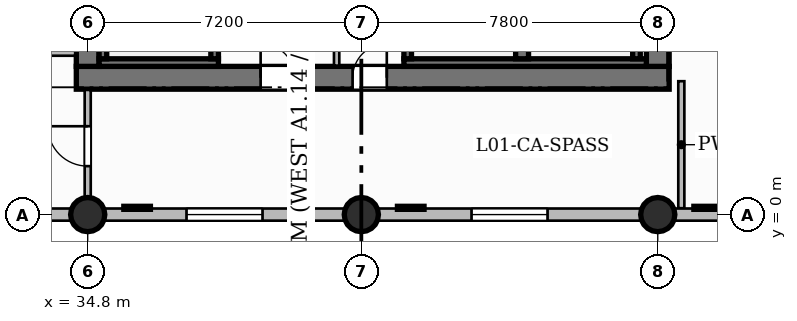
"""IFC4 building model, lengths in metres.
Left out: names, types, materials, properties, quantities, classifications, styles, units other than length and angle.
Written with IfcOpenShell. Run it as: python <this file> out.ifc"""

import sys

from ifc_helpers import new_model, si_unit, direction, frame, frame_2d, origin, origin_2d, place, context, subcontext, project, spatial, rectangle, circle, extrude, source, transform, mapped, element, fill, save


model = new_model("IFC4")
c1 = context("Model", 3, precision=1e-05, world=origin(), true_north=direction((0.0, 1.0)))
c2 = subcontext(c1, "Body", "Model", "MODEL_VIEW")
j1 = project(units=[si_unit("LENGTHUNIT", "METRE"), si_unit("PLANEANGLEUNIT", "RADIAN")], contexts=[c1])
p1 = place(None, origin())
s1 = spatial("IfcSite", under=j1, at=p1, CompositionType="ELEMENT")
p2 = place(p1, origin())
s2 = spatial("IfcBuilding", under=s1, at=p2, CompositionType="ELEMENT")
p3 = place(p2, frame((0.0, 0.0, 5.4)))
s3 = spatial("IfcBuildingStorey", under=s2, at=p3, CompositionType="ELEMENT", Elevation=5.4)
p4 = place(p3, frame((34.5, 3.6, 0.0), z_axis=(0.0, 0.0, 1.0), x_axis=(1.0, 0.0, 0.0)))
e1 = element("IfcWall", 1, at=p4, inside=s3, PredefinedType="SHEAR", context=c2, shape_type="SweptSolid", body=[
    extrude(rectangle(XDim=15.6, YDim=0.6, at=frame_2d((7.8, 0.0))), origin(), (0.0, 0.0, 1.0), 5.4),
])
p5 = place(p4, frame((4.85, 0.0, 0.0)))
e2 = element("IfcOpeningElement", 2, at=p5, cuts=e1, PredefinedType="OPENING", context=c2, shape_type="SweptSolid", body=[
    extrude(rectangle(XDim=0.9, YDim=2.1, at=frame_2d((0.45, 1.05))), frame((0.0, 0.31, 0.0), z_axis=(0.0, -1.0, 0.0), x_axis=(1.0, 0.0, 0.0)), (0.0, 0.0, 1.0), 0.62),
])
p6 = place(p4, frame((7.27, 0.0, 0.0)))
e3 = element("IfcOpeningElement", 3, at=p6, cuts=e1, PredefinedType="OPENING", context=c2, shape_type="SweptSolid", body=[
    extrude(rectangle(XDim=0.9, YDim=2.1, at=frame_2d((0.45, 1.05))), frame((0.0, 0.31, 0.0), z_axis=(0.0, -1.0, 0.0), x_axis=(1.0, 0.0, 0.0)), (0.0, 0.0, 1.0), 0.62),
])
for number, where, z_axis, x_axis in (
    (4, (34.8, 3.9, 0.0), (0.0, 0.0, 1.0), (0.0, 1.0, 0.0)),
    (5, (49.8, 3.9, 0.0), (0.0, 0.0, 1.0), (0.0, 1.0, 0.0)),
):
    element("IfcWall", number, at=place(p3, frame(where, z_axis=z_axis, x_axis=x_axis)), inside=s3, PredefinedType="SHEAR", context=c2, shape_type="SweptSolid", body=[
        extrude(rectangle(XDim=10.2, YDim=0.6, at=frame_2d((5.1, 0.0))), origin(), (0.0, 0.0, 1.0), 5.4),
    ])
m1 = source(origin(), c2, "Body", "SweptSolid", [
    extrude(circle(Radius=0.45, at=origin_2d()), origin(), (0.0, 0.0, 1.0), 5.4),
])
for number, where, z_axis, x_axis in (
    (6, (34.8, 0.0, 0.0), (0.0, 0.0, 1.0), (1.0, 0.0, 0.0)),
    (7, (42.0, 0.0, 0.0), (0.0, 0.0, 1.0), (1.0, 0.0, 0.0)),
    (8, (49.8, 0.0, 0.0), (0.0, 0.0, 1.0), (1.0, 0.0, 0.0)),
):
    element("IfcColumn", number, at=place(p3, frame(where, z_axis=z_axis, x_axis=x_axis)), inside=s3, PredefinedType="COLUMN", context=c2, shape_type="MappedRepresentation", body=[
        mapped(m1, transform((0.0, 0.0, 0.0), scale=1.0)),
    ])
p7 = place(p3, frame((35.1, 4.0, 0.0), z_axis=(0.0, 0.0, 1.0), x_axis=(1.0, 0.0, 0.0)))
e9 = element("IfcWall", 9, at=p7, inside=s3, PredefinedType="SHEAR", context=c2, shape_type="SweptSolid", body=[
    extrude(rectangle(XDim=3.14, YDim=0.2, at=frame_2d((1.57, 0.0))), origin(), (0.0, 0.0, 1.0), 5.4),
])
for number, where, z_axis, x_axis in (
    (10, (35.2, 4.1, 0.0), (0.0, 0.0, 1.0), (0.0, 1.0, 0.0)),
    (11, (38.14, 4.1, 0.0), (0.0, 0.0, 1.0), (0.0, 1.0, 0.0)),
):
    element("IfcWall", number, at=place(p3, frame(where, z_axis=z_axis, x_axis=x_axis)), inside=s3, PredefinedType="SHEAR", context=c2, shape_type="SweptSolid", body=[
        extrude(rectangle(XDim=6.95, YDim=0.2, at=frame_2d((3.475, 0.0))), origin(), (0.0, 0.0, 1.0), 5.4),
    ])
p8 = place(p3, frame((43.12, 4.0, 0.0), z_axis=(0.0, 0.0, 1.0), x_axis=(1.0, 0.0, 0.0)))
e12 = element("IfcWall", 12, at=p8, inside=s3, PredefinedType="SHEAR", context=c2, shape_type="SweptSolid", body=[
    extrude(rectangle(XDim=6.38, YDim=0.2, at=frame_2d((3.19, 0.0))), origin(), (0.0, 0.0, 1.0), 5.4),
])
p9 = place(p3, frame((43.22, 4.1, 0.0), z_axis=(0.0, 0.0, 1.0), x_axis=(0.0, 1.0, 0.0)))
e13 = element("IfcWall", 13, at=p9, inside=s3, PredefinedType="SHEAR", context=c2, shape_type="SweptSolid", body=[
    extrude(rectangle(XDim=6.95, YDim=0.2, at=frame_2d((3.475, 0.0))), origin(), (0.0, 0.0, 1.0), 5.4),
])
p10 = place(p3, frame((46.23, 4.1, 0.0), z_axis=(0.0, 0.0, 1.0), x_axis=(0.0, 1.0, 0.0)))
e14 = element("IfcWall", 14, at=p10, inside=s3, PredefinedType="SHEAR", context=c2, shape_type="SweptSolid", body=[
    extrude(rectangle(XDim=6.95, YDim=0.34, at=frame_2d((3.475, 0.0))), origin(), (0.0, 0.0, 1.0), 5.4),
])
p11 = place(p3, frame((49.24, 4.1, 0.0), z_axis=(0.0, 0.0, 1.0), x_axis=(0.0, 1.0, 0.0)))
e15 = element("IfcWall", 15, at=p11, inside=s3, PredefinedType="SHEAR", context=c2, shape_type="SweptSolid", body=[
    extrude(rectangle(XDim=6.95, YDim=0.2, at=frame_2d((3.475, 0.0))), origin(), (0.0, 0.0, 1.0), 5.4),
])
p12 = place(p3, frame((41.35, 3.92, 0.0), z_axis=(0.0, 0.0, 1.0), x_axis=(0.0, 1.0, 0.0)))
e16 = element("IfcWall", 16, at=p12, inside=s3, PredefinedType="PARTITIONING", context=c2, shape_type="SweptSolid", body=[
    extrude(rectangle(XDim=2.16, YDim=0.14, at=frame_2d((1.08, 0.0))), origin(), (0.0, 0.0, 1.0), 5.1),
])
p13 = place(p3, frame((32.16, 4.28, 0.0), z_axis=(0.0, 0.0, 1.0), x_axis=(1.0, 0.0, 0.0)))
e17 = element("IfcWall", 17, at=p13, inside=s3, PredefinedType="PARTITIONING", context=c2, shape_type="SweptSolid", body=[
    extrude(rectangle(XDim=2.31, YDim=0.2, at=frame_2d((1.155, 0.0))), origin(), (0.0, 0.0, 1.0), 5.1),
])
p14 = place(p3, frame((34.8, 0.32, 0.0), z_axis=(0.0, 0.0, 1.0), x_axis=(0.0, 1.0, 0.0)))
e18 = element("IfcWall", 18, at=p14, inside=s3, PredefinedType="PARTITIONING", context=c2, shape_type="SweptSolid", body=[
    extrude(rectangle(XDim=2.96, YDim=0.16, at=frame_2d((1.48, 0.0))), origin(), (0.0, 0.0, 1.0), 5.1),
])
p15 = place(p14, frame((0.955, 0.0, 0.0)))
e19 = element("IfcOpeningElement", 19, at=p15, cuts=e18, PredefinedType="OPENING", context=c2, shape_type="SweptSolid", body=[
    extrude(rectangle(XDim=1.05, YDim=2.15, at=frame_2d((0.525, 1.075))), frame((0.0, 0.09, 0.0), z_axis=(0.0, -1.0, 0.0), x_axis=(1.0, 0.0, 0.0)), (0.0, 0.0, 1.0), 0.18),
])
p16 = place(p3, frame((50.42, 0.168, 0.0), z_axis=(0.0, 0.0, 1.0), x_axis=(0.0, 1.0, 0.0)))
e20 = element("IfcWall", 20, at=p16, inside=s3, PredefinedType="PARTITIONING", context=c2, shape_type="SweptSolid", body=[
    extrude(rectangle(XDim=3.342, YDim=0.16, at=frame_2d((1.671, 0.0))), origin(), (0.0, 0.0, 1.0), 5.1),
])
p17 = place(p3, frame((28.35, 0.0, 0.0), z_axis=(0.0, 0.0, 1.0), x_axis=(1.0, 0.0, 0.0)))
e21 = element("IfcWall", 21, at=p17, inside=s3, PredefinedType="SOLIDWALL", context=c2, shape_type="SweptSolid", body=[
    extrude(rectangle(XDim=52.05, YDim=0.32, at=frame_2d((26.025, 0.0))), origin(), (0.0, 0.0, 1.0), 4.185),
])
p18 = place(p17, frame((2.45, 0.0, 0.75)))
e22 = element("IfcOpeningElement", 22, at=p18, cuts=e21, PredefinedType="OPENING", context=c2, shape_type="SweptSolid", body=[
    extrude(rectangle(XDim=2.0, YDim=2.6, at=frame_2d((1.0, 1.3))), frame((0.0, 0.17, 0.0), z_axis=(0.0, -1.0, 0.0), x_axis=(1.0, 0.0, 0.0)), (0.0, 0.0, 1.0), 0.34),
])
p19 = place(p17, frame((9.05, 0.0, 0.75)))
e23 = element("IfcOpeningElement", 23, at=p19, cuts=e21, PredefinedType="OPENING", context=c2, shape_type="SweptSolid", body=[
    extrude(rectangle(XDim=2.0, YDim=2.6, at=frame_2d((1.0, 1.3))), frame((0.0, 0.17, 0.0), z_axis=(0.0, -1.0, 0.0), x_axis=(1.0, 0.0, 0.0)), (0.0, 0.0, 1.0), 0.34),
])
p20 = place(p17, frame((16.55, 0.0, 0.75)))
e24 = element("IfcOpeningElement", 24, at=p20, cuts=e21, PredefinedType="OPENING", context=c2, shape_type="SweptSolid", body=[
    extrude(rectangle(XDim=2.0, YDim=2.6, at=frame_2d((1.0, 1.3))), frame((0.0, 0.17, 0.0), z_axis=(0.0, -1.0, 0.0), x_axis=(1.0, 0.0, 0.0)), (0.0, 0.0, 1.0), 0.34),
])
p21 = place(p17, frame((24.35, 0.0, 0.75)))
e25 = element("IfcOpeningElement", 25, at=p21, cuts=e21, PredefinedType="OPENING", context=c2, shape_type="SweptSolid", body=[
    extrude(rectangle(XDim=2.0, YDim=2.6, at=frame_2d((1.0, 1.3))), frame((0.0, 0.17, 0.0), z_axis=(0.0, -1.0, 0.0), x_axis=(1.0, 0.0, 0.0)), (0.0, 0.0, 1.0), 0.34),
])
p22 = place(p17, frame((34.35, 0.0, 0.75)))
e26 = element("IfcOpeningElement", 26, at=p22, cuts=e21, PredefinedType="OPENING", context=c2, shape_type="SweptSolid", body=[
    extrude(rectangle(XDim=2.0, YDim=2.6, at=frame_2d((1.0, 1.3))), frame((0.0, 0.17, 0.0), z_axis=(0.0, -1.0, 0.0), x_axis=(1.0, 0.0, 0.0)), (0.0, 0.0, 1.0), 0.34),
])
p23 = place(p17, frame((41.75, 0.0, 0.75)))
e27 = element("IfcOpeningElement", 27, at=p23, cuts=e21, PredefinedType="OPENING", context=c2, shape_type="SweptSolid", body=[
    extrude(rectangle(XDim=2.0, YDim=2.6, at=frame_2d((1.0, 1.3))), frame((0.0, 0.17, 0.0), z_axis=(0.0, -1.0, 0.0), x_axis=(1.0, 0.0, 0.0)), (0.0, 0.0, 1.0), 0.34),
])
p24 = place(p17, frame((47.15, 0.0, 0.75)))
e28 = element("IfcOpeningElement", 28, at=p24, cuts=e21, PredefinedType="OPENING", context=c2, shape_type="SweptSolid", body=[
    extrude(rectangle(XDim=2.0, YDim=2.6, at=frame_2d((1.0, 1.3))), frame((0.0, 0.17, 0.0), z_axis=(0.0, -1.0, 0.0), x_axis=(1.0, 0.0, 0.0)), (0.0, 0.0, 1.0), 0.34),
])
m2 = source(origin(), c2, "Body", "SweptSolid", [
    extrude(rectangle(XDim=0.9, YDim=2.1, at=frame_2d((0.45, 1.05))), frame((0.0, 0.025, 0.0), z_axis=(0.0, -1.0, 0.0), x_axis=(1.0, 0.0, 0.0)), (0.0, 0.0, 1.0), 0.05),
])
p25 = place(p5, origin())
e29 = element("IfcDoor", 29, at=p25, inside=s3, OperationType="SINGLE_SWING_LEFT", PredefinedType="DOOR", context=c2, shape_type="MappedRepresentation", body=[
    mapped(m2, transform((0.0, 0.0, 0.0), scale=1.0)),
])
fill(e2, e29)
p26 = place(p6, origin())
e30 = element("IfcDoor", 30, at=p26, inside=s3, OperationType="SINGLE_SWING_RIGHT", PredefinedType="DOOR", context=c2, shape_type="MappedRepresentation", body=[
    mapped(m2, transform((0.0, 0.0, 0.0), scale=1.0)),
])
fill(e3, e30)
m3 = source(origin(), c2, "Body", "SweptSolid", [
    extrude(rectangle(XDim=1.05, YDim=2.15, at=frame_2d((0.525, 1.075))), frame((0.0, 0.025, 0.0), z_axis=(0.0, -1.0, 0.0), x_axis=(1.0, 0.0, 0.0)), (0.0, 0.0, 1.0), 0.05),
])
p27 = place(p15, origin())
e31 = element("IfcDoor", 31, at=p27, inside=s3, OperationType="SINGLE_SWING_RIGHT", PredefinedType="DOOR", context=c2, shape_type="MappedRepresentation", body=[
    mapped(m3, transform((0.0, 0.0, 0.0), scale=1.0)),
])
fill(e19, e31)
m4 = source(origin(), c2, "Body", "SweptSolid", [
    extrude(rectangle(XDim=2.0, YDim=2.6, at=frame_2d((1.0, 1.3))), frame((0.0, 0.03, 0.0), z_axis=(0.0, -1.0, 0.0), x_axis=(1.0, 0.0, 0.0)), (0.0, 0.0, 1.0), 0.06),
])
p28 = place(p19, origin())
e32 = element("IfcWindow", 32, at=p28, inside=s3, PartitioningType="DOUBLE_PANEL_VERTICAL", PredefinedType="WINDOW", context=c2, shape_type="MappedRepresentation", body=[
    mapped(m4, transform((0.0, 0.0, 0.0), scale=1.0)),
])
fill(e23, e32)
p29 = place(p20, origin())
e33 = element("IfcWindow", 33, at=p29, inside=s3, PartitioningType="DOUBLE_PANEL_VERTICAL", PredefinedType="WINDOW", context=c2, shape_type="MappedRepresentation", body=[
    mapped(m4, transform((0.0, 0.0, 0.0), scale=1.0)),
])
fill(e24, e33)
save(model, sys.argv[1])
